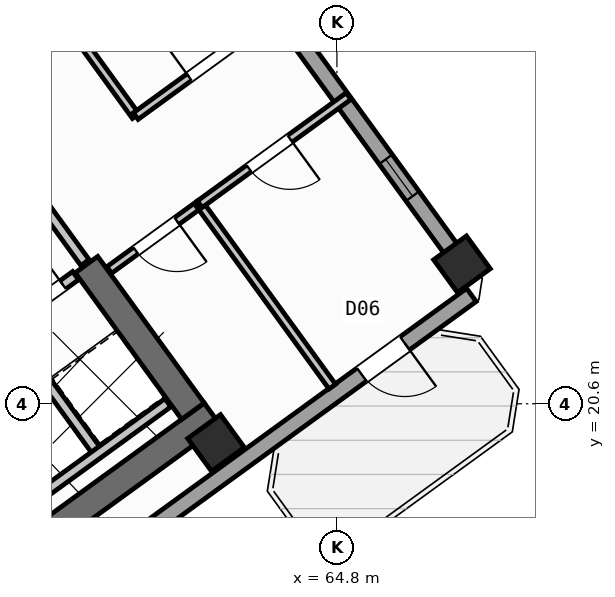
"""IFC4 building model, lengths in metres.
Left out: names, types, materials, properties, quantities, classifications, styles, units other than length and angle.
Written with IfcOpenShell. Run it as: python <this file> out.ifc"""

import sys

from ifc_helpers import new_model, si_unit, direction, frame, frame_2d, origin, origin_2d, place, context, subcontext, project, spatial, rectangle, hollow_rectangle, extrude, source, transform, mapped, element, fill, save


model = new_model("IFC4")
c1 = context("Model", 3, precision=1e-05, world=origin(), true_north=direction((0.0, 1.0)))
c2 = subcontext(c1, "Body", "Model", "MODEL_VIEW")
j1 = project(units=[si_unit("LENGTHUNIT", "METRE"), si_unit("PLANEANGLEUNIT", "RADIAN")], contexts=[c1])
p1 = place(None, origin())
s1 = spatial("IfcSite", under=j1, at=p1, CompositionType="ELEMENT")
p2 = place(p1, origin())
s2 = spatial("IfcBuilding", under=s1, at=p2, CompositionType="ELEMENT")
p3 = place(p2, frame((0.0, 0.0, 204.0)))
s3 = spatial("IfcBuildingStorey", under=s2, at=p3, CompositionType="ELEMENT", Elevation=204.0)
p4 = place(p3, frame((52.359, 13.14, 0.0), z_axis=(0.0, 0.0, 1.0), x_axis=(0.809014896919, 0.587788139183, 0.0)))
e1 = element("IfcWall", 1, at=p4, inside=s3, PredefinedType="SHEAR", context=c2, shape_type="SweptSolid", body=[
    extrude(rectangle(XDim=12.34, YDim=0.55, at=frame_2d((6.17, 0.0))), origin(), (0.0, 0.0, 1.0), 3.35),
])
p5 = place(p3, frame((61.958, 20.454, 0.0), z_axis=(0.0, 0.0, 1.0), x_axis=(-0.587802113096, 0.809004744015, 0.0)))
e2 = element("IfcWall", 2, at=p5, inside=s3, PredefinedType="SHEAR", context=c2, shape_type="SweptSolid", body=[
    extrude(rectangle(XDim=3.575, YDim=0.55, at=frame_2d((1.788, 0.0))), origin(), (0.0, 0.0, 1.0), 3.35),
])
m1 = source(origin(), c2, "Body", "SweptSolid", [
    extrude(hollow_rectangle(XDim=0.8, YDim=0.8, WallThickness=0.032, at=origin_2d()), origin(), (0.0, 0.0, 1.0), 3.6),
])
for number, where, z_axis, x_axis in (
    (3, (62.414, 19.827, 0.0), (0.0, 0.0, 1.0), (0.809, 0.588, 0.0)),
    (4, (67.268, 23.354, 0.0), (0.0, 0.0, 1.0), (0.809, 0.588, 0.0)),
):
    element("IfcColumn", number, at=place(p3, frame(where, z_axis=z_axis, x_axis=x_axis)), inside=s3, PredefinedType="COLUMN", context=c2, shape_type="MappedRepresentation", body=[
        mapped(m1, transform((0.0, 0.0, 0.0), scale=1.0)),
    ])
p6 = place(p3, frame((54.81, 40.5, 0.0), z_axis=(0.0, 0.0, 1.0), x_axis=(0.587783625747, -0.809018176127, 0.0)))
e5 = element("IfcWall", 5, at=p6, inside=s3, PredefinedType="STANDARD", context=c2, shape_type="SweptSolid", body=[
    extrude(rectangle(XDim=21.587, YDim=0.32, at=frame_2d((10.794, 0.0))), origin(), (0.0, 0.0, 1.0), 2.825),
])
p7 = place(p6, frame((2.343, 0.0, 0.9)))
e6 = element("IfcOpeningElement", 6, at=p7, cuts=e5, PredefinedType="OPENING", context=c2, shape_type="SweptSolid", body=[
    extrude(rectangle(XDim=1.65, YDim=1.45, at=frame_2d((0.825, 0.725))), frame((0.0, 0.17, 0.0), z_axis=(0.0, -1.0, 0.0), x_axis=(1.0, 0.0, 0.0)), (0.0, 0.0, 1.0), 0.34),
])
p8 = place(p6, frame((8.119, 0.0, 0.9)))
e7 = element("IfcOpeningElement", 7, at=p8, cuts=e5, PredefinedType="OPENING", context=c2, shape_type="SweptSolid", body=[
    extrude(rectangle(XDim=1.35, YDim=1.45, at=frame_2d((0.675, 0.725))), frame((0.0, 0.17, 0.0), z_axis=(0.0, -1.0, 0.0), x_axis=(1.0, 0.0, 0.0)), (0.0, 0.0, 1.0), 0.34),
])
p9 = place(p6, frame((11.019, 0.0, 0.9)))
e8 = element("IfcOpeningElement", 8, at=p9, cuts=e5, PredefinedType="OPENING", context=c2, shape_type="SweptSolid", body=[
    extrude(rectangle(XDim=1.35, YDim=1.45, at=frame_2d((0.675, 0.725))), frame((0.0, 0.17, 0.0), z_axis=(0.0, -1.0, 0.0), x_axis=(1.0, 0.0, 0.0)), (0.0, 0.0, 1.0), 0.34),
])
p10 = place(p6, frame((18.634, 0.0, 1.0)))
e9 = element("IfcOpeningElement", 9, at=p10, cuts=e5, PredefinedType="OPENING", context=c2, shape_type="SweptSolid", body=[
    extrude(rectangle(XDim=0.9, YDim=1.25, at=frame_2d((0.45, 0.625))), frame((0.0, 0.17, 0.0), z_axis=(0.0, -1.0, 0.0), x_axis=(1.0, 0.0, 0.0)), (0.0, 0.0, 1.0), 0.34),
])
p11 = place(p3, frame((67.454, 22.747, 0.0), z_axis=(0.0, 0.0, 1.0), x_axis=(-0.809021120468, -0.587779573171, 0.0)))
e10 = element("IfcWall", 10, at=p11, inside=s3, PredefinedType="STANDARD", context=c2, shape_type="SweptSolid", body=[
    extrude(rectangle(XDim=17.588, YDim=0.32, at=frame_2d((8.794, 0.0))), origin(), (0.0, 0.0, 1.0), 3.35),
])
p12 = place(p11, frame((1.624, 0.0, 0.0)))
e11 = element("IfcOpeningElement", 11, at=p12, cuts=e10, PredefinedType="OPENING", context=c2, shape_type="SweptSolid", body=[
    extrude(rectangle(XDim=1.05, YDim=2.15, at=frame_2d((0.525, 1.075))), frame((0.0, 0.17, 0.0), z_axis=(0.0, -1.0, 0.0), x_axis=(1.0, 0.0, 0.0)), (0.0, 0.0, 1.0), 0.34),
])
p13 = place(p11, frame((8.344, 0.0, 0.9)))
e12 = element("IfcOpeningElement", 12, at=p13, cuts=e10, PredefinedType="OPENING", context=c2, shape_type="SweptSolid", body=[
    extrude(rectangle(XDim=1.65, YDim=1.45, at=frame_2d((0.825, 0.725))), frame((0.0, 0.17, 0.0), z_axis=(0.0, -1.0, 0.0), x_axis=(1.0, 0.0, 0.0)), (0.0, 0.0, 1.0), 0.34),
])
p14 = place(p11, frame((13.594, 0.0, 0.9)))
e13 = element("IfcOpeningElement", 13, at=p14, cuts=e10, PredefinedType="OPENING", context=c2, shape_type="SweptSolid", body=[
    extrude(rectangle(XDim=1.65, YDim=1.45, at=frame_2d((0.825, 0.725))), frame((0.0, 0.17, 0.0), z_axis=(0.0, -1.0, 0.0), x_axis=(1.0, 0.0, 0.0)), (0.0, 0.0, 1.0), 0.34),
])
p15 = place(p3, frame((56.553, 20.884, 0.0), z_axis=(0.0, 0.0, 1.0), x_axis=(0.809023564264, 0.58777620951, 0.0)))
e14 = element("IfcWall", 14, at=p15, inside=s3, PredefinedType="STANDARD", context=c2, shape_type="SweptSolid", body=[
    extrude(rectangle(XDim=3.818, YDim=0.2, at=frame_2d((1.909, 0.0))), origin(), (0.0, 0.0, 1.0), 3.34),
])
p16 = place(p15, frame((2.65, 0.0, 0.0)))
e15 = element("IfcOpeningElement", 15, at=p16, cuts=e14, PredefinedType="OPENING", context=c2, shape_type="SweptSolid", body=[
    extrude(rectangle(XDim=0.86, YDim=2.05, at=frame_2d((0.43, 1.025))), frame((0.0, 0.11, 0.0), z_axis=(0.0, -1.0, 0.0), x_axis=(1.0, 0.0, 0.0)), (0.0, 0.0, 1.0), 0.22),
])
p17 = place(p3, frame((60.067, 19.655, 0.0), z_axis=(0.0, 0.0, 1.0), x_axis=(-0.587800520745, 0.809005900975, 0.0)))
e16 = element("IfcWall", 16, at=p17, inside=s3, PredefinedType="STANDARD", context=c2, shape_type="SweptSolid", body=[
    extrude(rectangle(XDim=2.66, YDim=0.2, at=frame_2d((1.33, 0.0))), origin(), (0.0, 0.0, 1.0), 3.34),
])
p18 = place(p3, frame((58.472, 18.447, 0.0), z_axis=(0.0, 0.0, 1.0), x_axis=(0.809018631237, 0.587782999339, 0.0)))
e17 = element("IfcWall", 17, at=p18, inside=s3, PredefinedType="STANDARD", context=c2, shape_type="SweptSolid", body=[
    extrude(rectangle(XDim=3.698, YDim=0.2, at=frame_2d((1.849, 0.0))), origin(), (0.0, 0.0, 1.0), 3.34),
])
p19 = place(p3, frame((59.827, 23.386, 0.0), z_axis=(0.0, 0.0, 1.0), x_axis=(-0.587803840107, 0.809003489211, 0.0)))
e18 = element("IfcWall", 18, at=p19, inside=s3, PredefinedType="STANDARD", context=c2, shape_type="SweptSolid", body=[
    extrude(rectangle(XDim=2.96, YDim=0.2, at=frame_2d((1.48, 0.0))), origin(), (0.0, 0.0, 1.0), 3.34),
])
p20 = place(p19, frame((1.68, 0.0, 0.0)))
e19 = element("IfcOpeningElement", 19, at=p20, cuts=e18, PredefinedType="OPENING", context=c2, shape_type="SweptSolid", body=[
    extrude(rectangle(XDim=1.0, YDim=2.1, at=frame_2d((0.5, 1.05))), frame((0.0, 0.11, 0.0), z_axis=(0.0, -1.0, 0.0), x_axis=(1.0, 0.0, 0.0)), (0.0, 0.0, 1.0), 0.22),
])
p21 = place(p3, frame((60.307, 23.24, 0.0), z_axis=(0.0, 0.0, 1.0), x_axis=(0.80898466188, 0.58782975158, 0.0)))
e20 = element("IfcWall", 20, at=p21, inside=s3, PredefinedType="PARTITIONING", context=c2, shape_type="SweptSolid", body=[
    extrude(rectangle(XDim=2.208, YDim=0.16, at=frame_2d((1.104, 0.0))), origin(), (0.0, 0.0, 1.0), 3.34),
])
p22 = place(p21, frame((0.648, 0.0, 0.0)))
e21 = element("IfcOpeningElement", 21, at=p22, cuts=e20, PredefinedType="OPENING", context=c2, shape_type="SweptSolid", body=[
    extrude(rectangle(XDim=1.0, YDim=2.1, at=frame_2d((0.5, 1.05))), frame((0.0, 0.09, 0.0), z_axis=(0.0, -1.0, 0.0), x_axis=(1.0, 0.0, 0.0)), (0.0, 0.0, 1.0), 0.18),
])
p23 = place(p3, frame((64.709, 20.938, 0.0), z_axis=(0.0, 0.0, 1.0), x_axis=(-0.587773666605, 0.809025411743, 0.0)))
e22 = element("IfcWall", 22, at=p23, inside=s3, PredefinedType="PARTITIONING", context=c2, shape_type="SweptSolid", body=[
    extrude(rectangle(XDim=4.45, YDim=0.16, at=frame_2d((2.225, 0.0))), origin(), (0.0, 0.0, 1.0), 3.34),
])
p24 = place(p3, frame((60.829, 26.278, 0.0), z_axis=(0.0, 0.0, 1.0), x_axis=(-0.587777474174, 0.809022645451, 0.0)))
e23 = element("IfcWall", 23, at=p24, inside=s3, PredefinedType="PARTITIONING", context=c2, shape_type="SweptSolid", body=[
    extrude(rectangle(XDim=15.1, YDim=0.16, at=frame_2d((7.55, 0.0))), origin(), (0.0, 0.0, 1.0), 3.34),
])
p25 = place(p3, frame((62.093, 24.538, 0.0), z_axis=(0.0, 0.0, 1.0), x_axis=(0.809035546126, 0.58775971715, 0.0)))
e24 = element("IfcWall", 24, at=p25, inside=s3, PredefinedType="PARTITIONING", context=c2, shape_type="SweptSolid", body=[
    extrude(rectangle(XDim=3.63, YDim=0.16, at=frame_2d((1.815, 0.0))), origin(), (0.0, 0.0, 1.0), 3.34),
])
p26 = place(p25, frame((1.2, 0.0, 0.0)))
e25 = element("IfcOpeningElement", 25, at=p26, cuts=e24, PredefinedType="OPENING", context=c2, shape_type="SweptSolid", body=[
    extrude(rectangle(XDim=1.0, YDim=2.1, at=frame_2d((0.5, 1.05))), frame((0.0, 0.09, 0.0), z_axis=(0.0, -1.0, 0.0), x_axis=(1.0, 0.0, 0.0)), (0.0, 0.0, 1.0), 0.18),
])
p27 = place(p3, frame((60.829, 26.278, 0.0), z_axis=(0.0, 0.0, 1.0), x_axis=(0.809003564202, 0.587803736896, 0.0)))
e26 = element("IfcWall", 26, at=p27, inside=s3, PredefinedType="PARTITIONING", context=c2, shape_type="SweptSolid", body=[
    extrude(rectangle(XDim=3.63, YDim=0.16, at=frame_2d((1.815, 0.0))), origin(), (0.0, 0.0, 1.0), 3.34),
])
p28 = place(p27, frame((1.305, 0.0, 0.0)))
e27 = element("IfcOpeningElement", 27, at=p28, cuts=e26, PredefinedType="OPENING", context=c2, shape_type="SweptSolid", body=[
    extrude(rectangle(XDim=1.0, YDim=2.1, at=frame_2d((0.5, 1.05))), frame((0.0, 0.09, 0.0), z_axis=(0.0, -1.0, 0.0), x_axis=(1.0, 0.0, 0.0)), (0.0, 0.0, 1.0), 0.18),
])
m2 = source(origin(), c2, "Body", "SweptSolid", [
    extrude(rectangle(XDim=1.05, YDim=2.15, at=frame_2d((0.525, 1.075))), frame((0.0, 0.025, 0.0), z_axis=(0.0, -1.0, 0.0), x_axis=(1.0, 0.0, 0.0)), (0.0, 0.0, 1.0), 0.05),
])
p29 = place(p12, origin())
e28 = element("IfcDoor", 28, at=p29, inside=s3, OperationType="SINGLE_SWING_LEFT", PredefinedType="DOOR", context=c2, shape_type="MappedRepresentation", body=[
    mapped(m2, transform((0.0, 0.0, 0.0), scale=1.0)),
])
fill(e11, e28)
m3 = source(origin(), c2, "Body", "SweptSolid", [
    extrude(rectangle(XDim=0.9, YDim=1.25, at=frame_2d((0.45, 0.625))), frame((0.0, 0.03, 0.0), z_axis=(0.0, -1.0, 0.0), x_axis=(1.0, 0.0, 0.0)), (0.0, 0.0, 1.0), 0.06),
])
p30 = place(p10, origin())
e29 = element("IfcWindow", 29, at=p30, inside=s3, PartitioningType="SINGLE_PANEL", PredefinedType="WINDOW", context=c2, shape_type="MappedRepresentation", body=[
    mapped(m3, transform((0.0, 0.0, 0.0), scale=1.0)),
])
fill(e9, e29)
m4 = source(origin(), c2, "Body", "SweptSolid", [
    extrude(rectangle(XDim=0.86, YDim=2.05, at=frame_2d((0.43, 1.025))), frame((0.0, 0.025, 0.0), z_axis=(0.0, -1.0, 0.0), x_axis=(1.0, 0.0, 0.0)), (0.0, 0.0, 1.0), 0.05),
])
p31 = place(p16, origin())
e30 = element("IfcDoor", 30, at=p31, inside=s3, OperationType="SINGLE_SWING_RIGHT", PredefinedType="DOOR", context=c2, shape_type="MappedRepresentation", body=[
    mapped(m4, transform((0.0, 0.0, 0.0), scale=1.0)),
])
fill(e15, e30)
m5 = source(origin(), c2, "Body", "SweptSolid", [
    extrude(rectangle(XDim=1.0, YDim=2.1, at=frame_2d((0.5, 1.05))), frame((0.0, 0.025, 0.0), z_axis=(0.0, -1.0, 0.0), x_axis=(1.0, 0.0, 0.0)), (0.0, 0.0, 1.0), 0.05),
])
p32 = place(p22, frame((1.0, 0.0, 0.0), z_axis=(0.0, 0.0, 1.0), x_axis=(-1.0, 0.0, 0.0)))
e31 = element("IfcDoor", 31, at=p32, inside=s3, OperationType="SINGLE_SWING_LEFT", PredefinedType="DOOR", context=c2, shape_type="MappedRepresentation", body=[
    mapped(m5, transform((0.0, 0.0, 0.0), scale=1.0)),
])
fill(e21, e31)
p33 = place(p28, origin())
e32 = element("IfcDoor", 32, at=p33, inside=s3, OperationType="SINGLE_SWING_LEFT", PredefinedType="DOOR", context=c2, shape_type="MappedRepresentation", body=[
    mapped(m5, transform((0.0, 0.0, 0.0), scale=1.0)),
])
fill(e27, e32)
p34 = place(p26, frame((1.0, 0.0, 0.0), z_axis=(0.0, 0.0, 1.0), x_axis=(-1.0, 0.0, 0.0)))
e33 = element("IfcDoor", 33, at=p34, inside=s3, OperationType="SINGLE_SWING_LEFT", PredefinedType="DOOR", context=c2, shape_type="MappedRepresentation", body=[
    mapped(m5, transform((0.0, 0.0, 0.0), scale=1.0)),
])
fill(e25, e33)
save(model, sys.argv[1])
